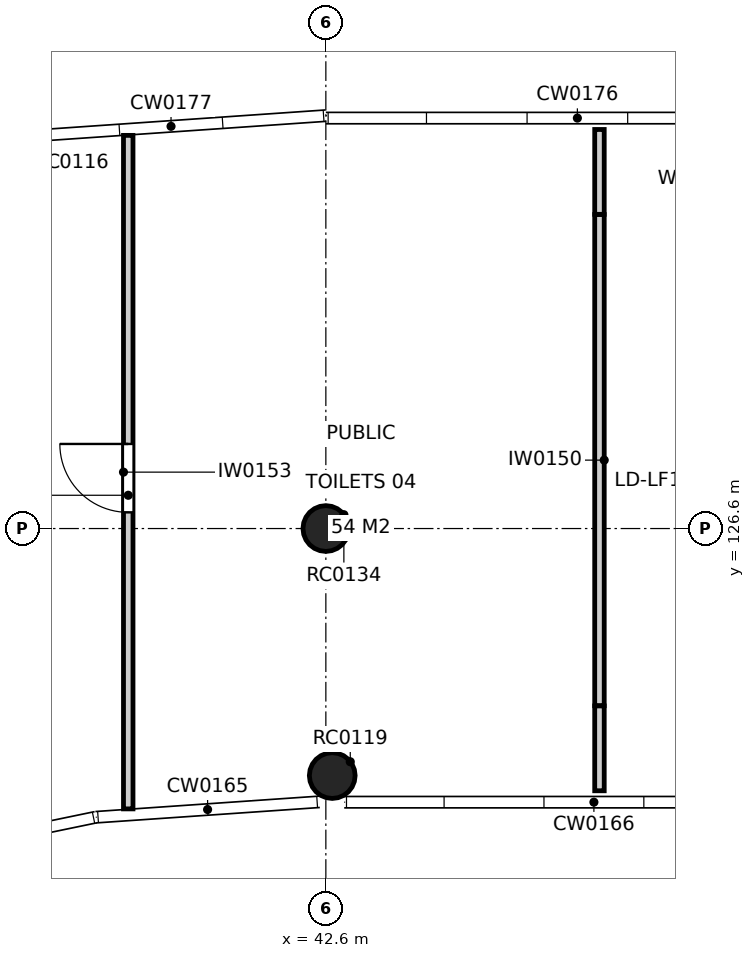
"""IFC4 building model, lengths in metres.
Left out: names, types, materials, properties, quantities, classifications, styles, units other than length and angle.
Written with IfcOpenShell. Run it as: python <this file> out.ifc"""

import sys

from ifc_helpers import new_model, si_unit, direction, frame, frame_2d, origin, origin_2d, place, context, subcontext, project, spatial, rectangle, circle, extrude, element, fill, save


model = new_model("IFC4")
c1 = context("Model", 3, precision=1e-05, world=origin(), true_north=direction((0.0, 1.0)))
c2 = subcontext(c1, "Body", "Model", "MODEL_VIEW")
j1 = project(units=[si_unit("LENGTHUNIT", "METRE"), si_unit("PLANEANGLEUNIT", "RADIAN")], contexts=[c1])
p1 = place(None, origin())
s1 = spatial("IfcSite", under=j1, at=p1, CompositionType="ELEMENT")
p2 = place(p1, origin())
s2 = spatial("IfcBuilding", under=s1, at=p2, CompositionType="ELEMENT")
p3 = place(p2, frame((0.0, 0.0, 4.8)))
s3 = spatial("IfcBuildingStorey", under=s2, at=p3, CompositionType="ELEMENT", Elevation=4.8)
for number, where, z_axis, x_axis in (
    (1, (42.684, 123.35, 0.0), (0.0, 0.0, 1.0), (1.0, 0.0, 0.0)),
    (2, (42.6, 126.6, 0.0), (0.0, 0.0, 1.0), (1.0, 0.0, 0.0)),
):
    element("IfcColumn", number, at=place(p3, frame(where, z_axis=z_axis, x_axis=x_axis)), inside=s3, PredefinedType="COLUMN", context=c2, shape_type="SweptSolid", body=[
        extrude(circle(Radius=0.3, at=origin_2d()), origin(), (0.0, 0.0, 1.0), 4.8),
    ])
p4 = place(p3, frame((46.2, 130.731, 0.0), z_axis=(0.0, 0.0, 1.0), x_axis=(0.0, -1.0, 0.0)))
e3 = element("IfcWall", 3, at=p4, inside=s3, PredefinedType="PARTITIONING", context=c2, shape_type="SweptSolid", body=[
    extrude(rectangle(XDim=6.462, YDim=0.125, at=frame_2d((3.231, 0.0))), origin(), (0.0, 0.0, 1.0), 3.75),
])
for number, where, z_axis, x_axis in (
    (4, (46.2, 131.85, 0.0), (0.0, 0.0, 1.0), (0.0, -1.0, 0.0)),
    (5, (46.2, 124.266, 0.0), (0.0, 0.0, 1.0), (0.0, -1.0, 0.0)),
):
    element("IfcWall", number, at=place(p3, frame(where, z_axis=z_axis, x_axis=x_axis)), inside=s3, PredefinedType="PARTITIONING", context=c2, shape_type="SweptSolid", body=[
        extrude(rectangle(XDim=1.116, YDim=0.125, at=frame_2d((0.558, 0.0))), origin(), (0.0, 0.0, 1.0), 3.75),
    ])
p5 = place(p3, frame((40.0, 122.912, 0.0), z_axis=(0.0, 0.0, 1.0), x_axis=(0.0, 1.0, 0.0)))
e6 = element("IfcWall", 6, at=p5, inside=s3, PredefinedType="PARTITIONING", context=c2, shape_type="SweptSolid", body=[
    extrude(rectangle(XDim=8.861, YDim=0.125, at=frame_2d((4.43, 0.0))), origin(), (0.0, 0.0, 1.0), 3.75),
])
p6 = place(p5, frame((3.901, 0.0, 0.0)))
e7 = element("IfcOpeningElement", 7, at=p6, cuts=e6, PredefinedType="OPENING", context=c2, shape_type="SweptSolid", body=[
    extrude(rectangle(XDim=0.9, YDim=2.1, at=frame_2d((0.45, 1.05))), frame((0.0, 0.073, 0.0), z_axis=(0.0, -1.0, 0.0), x_axis=(1.0, 0.0, 0.0)), (0.0, 0.0, 1.0), 0.145),
])
p7 = place(p6, origin())
e8 = element("IfcDoor", 8, at=p7, inside=s3, OperationType="SINGLE_SWING_RIGHT", PredefinedType="DOOR", context=c2, shape_type="SweptSolid", body=[
    extrude(rectangle(XDim=0.9, YDim=2.1, at=frame_2d((0.45, 1.05))), frame((0.0, 0.025, 0.0), z_axis=(0.0, -1.0, 0.0), x_axis=(1.0, 0.0, 0.0)), (0.0, 0.0, 1.0), 0.05),
])
fill(e7, e8)
save(model, sys.argv[1])
